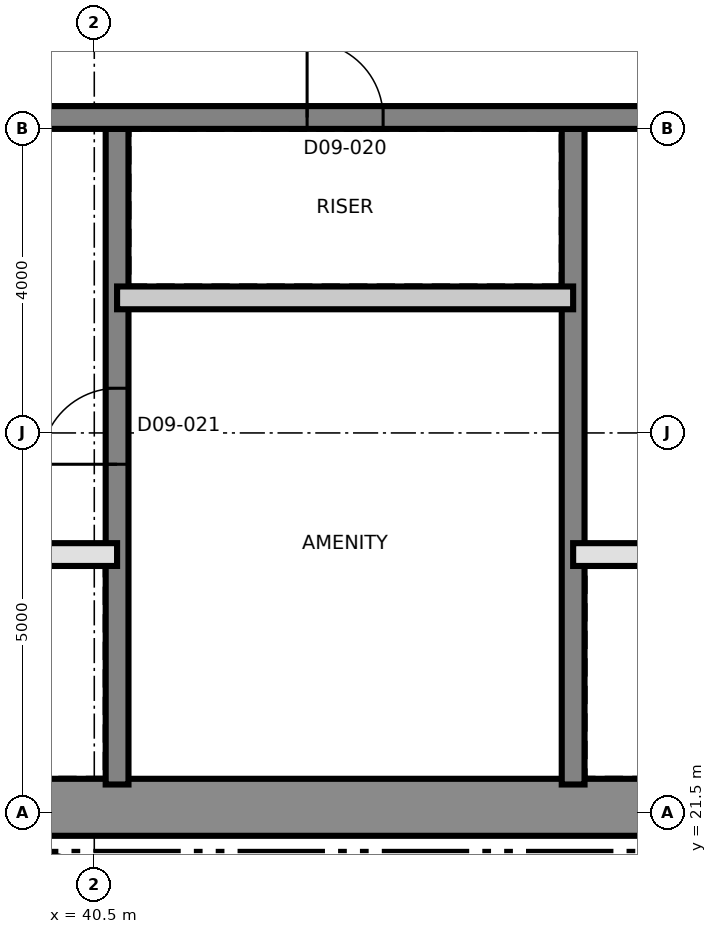
"""IFC4 building model, lengths in metres.
Left out: names, types, materials, properties, quantities, classifications, styles, units other than length and angle.
Written with IfcOpenShell. Run it as: python <this file> out.ifc"""

import sys

from ifc_helpers import new_model, si_unit, direction, frame, frame_2d, origin, place, context, subcontext, project, spatial, rectangle, extrude, element, fill, save


model = new_model("IFC4")
c1 = context("Model", 3, precision=1e-05, world=origin(), true_north=direction((0.0, 1.0)))
c2 = subcontext(c1, "Body", "Model", "MODEL_VIEW")
j1 = project(units=[si_unit("LENGTHUNIT", "METRE"), si_unit("PLANEANGLEUNIT", "RADIAN")], contexts=[c1])
p1 = place(None, origin())
s1 = spatial("IfcSite", under=j1, at=p1, CompositionType="ELEMENT")
p2 = place(p1, origin())
s2 = spatial("IfcBuilding", under=s1, at=p2, CompositionType="ELEMENT")
p3 = place(p2, frame((0.0, 0.0, 113.0)))
s3 = spatial("IfcBuildingStorey", under=s2, at=p3, CompositionType="ELEMENT", Elevation=113.0)
p4 = place(p3, frame((31.125, 21.575, 0.0), z_axis=(0.0, 0.0, 1.0), x_axis=(1.0, 0.0, 0.0)))
e1 = element("IfcWall", 1, at=p4, inside=s3, PredefinedType="SHEAR", context=c2, shape_type="SweptSolid", body=[
    extrude(rectangle(XDim=27.0, YDim=0.75, at=frame_2d((13.5, 0.0))), origin(), (0.0, 0.0, 1.0), 3.7),
])
p5 = place(p3, frame((40.8, 21.875, 0.0), z_axis=(0.0, 0.0, 1.0), x_axis=(0.0, 1.0, 0.0)))
e2 = element("IfcWall", 2, at=p5, inside=s3, PredefinedType="SHEAR", context=c2, shape_type="SweptSolid", body=[
    extrude(rectangle(XDim=8.625, YDim=0.3, at=frame_2d((4.312, 0.0))), origin(), (0.0, 0.0, 1.0), 3.7),
])
p6 = place(p5, frame((4.213, 0.0, 0.0)))
e3 = element("IfcOpeningElement", 3, at=p6, cuts=e2, PredefinedType="OPENING", context=c2, shape_type="SweptSolid", body=[
    extrude(rectangle(XDim=1.0, YDim=2.1, at=frame_2d((0.5, 1.05))), frame((0.0, 0.16, 0.0), z_axis=(0.0, -1.0, 0.0), x_axis=(1.0, 0.0, 0.0)), (0.0, 0.0, 1.0), 0.32),
])
p7 = place(p3, frame((46.8, 21.875, 0.0), z_axis=(0.0, 0.0, 1.0), x_axis=(0.0, 1.0, 0.0)))
e4 = element("IfcWall", 4, at=p7, inside=s3, PredefinedType="SHEAR", context=c2, shape_type="SweptSolid", body=[
    extrude(rectangle(XDim=8.625, YDim=0.3, at=frame_2d((4.312, 0.0))), origin(), (0.0, 0.0, 1.0), 3.7),
])
p8 = place(p3, frame((31.875, 30.65, 0.0), z_axis=(0.0, 0.0, 1.0), x_axis=(1.0, 0.0, 0.0)))
e5 = element("IfcWall", 5, at=p8, inside=s3, PredefinedType="SHEAR", context=c2, shape_type="SweptSolid", body=[
    extrude(rectangle(XDim=26.25, YDim=0.3, at=frame_2d((13.125, 0.0))), origin(), (0.0, 0.0, 1.0), 3.7),
])
p9 = place(p8, frame((24.625, 0.0, 0.0)))
e6 = element("IfcOpeningElement", 6, at=p9, cuts=e5, PredefinedType="OPENING", context=c2, shape_type="SweptSolid", body=[
    extrude(rectangle(XDim=1.0, YDim=2.1, at=frame_2d((0.5, 1.05))), frame((0.0, 0.16, 0.0), z_axis=(0.0, -1.0, 0.0), x_axis=(1.0, 0.0, 0.0)), (0.0, 0.0, 1.0), 0.32),
])
p10 = place(p8, frame((11.425, 0.0, 0.0)))
e7 = element("IfcOpeningElement", 7, at=p10, cuts=e5, PredefinedType="OPENING", context=c2, shape_type="SweptSolid", body=[
    extrude(rectangle(XDim=1.0, YDim=2.1, at=frame_2d((0.5, 1.05))), frame((0.0, 0.16, 0.0), z_axis=(0.0, -1.0, 0.0), x_axis=(1.0, 0.0, 0.0)), (0.0, 0.0, 1.0), 0.32),
])
p11 = place(p3, frame((39.735, 20.846, 0.0), z_axis=(0.0, 0.0, 1.0), x_axis=(0.97206095595, -0.234728562212, 0.0)))
e8 = element("IfcWall", 8, at=p11, inside=s3, PredefinedType="SOLIDWALL", context=c2, shape_type="SweptSolid", body=[
    extrude(rectangle(XDim=2.35, YDim=0.3, at=frame_2d((1.175, 0.0))), origin(), (0.0, 0.0, 1.0), 3.4),
])
p12 = place(p3, frame((31.8, 24.9, 0.0), z_axis=(0.0, 0.0, 1.0), x_axis=(1.0, 0.0, 0.0)))
e9 = element("IfcWall", 9, at=p12, inside=s3, PredefinedType="SOLIDWALL", context=c2, shape_type="SweptSolid", body=[
    extrude(rectangle(XDim=9.0, YDim=0.3, at=frame_2d((4.5, 0.0))), origin(), (0.0, 0.0, 1.0), 3.4),
])
p13 = place(p12, frame((7.05, 0.0, 0.0)))
e10 = element("IfcOpeningElement", 10, at=p13, cuts=e9, PredefinedType="OPENING", context=c2, shape_type="SweptSolid", body=[
    extrude(rectangle(XDim=0.9, YDim=2.1, at=frame_2d((0.45, 1.05))), frame((0.0, 0.16, 0.0), z_axis=(0.0, -1.0, 0.0), x_axis=(1.0, 0.0, 0.0)), (0.0, 0.0, 1.0), 0.32),
])
p14 = place(p12, frame((0.95, 0.0, 0.0)))
e11 = element("IfcOpeningElement", 11, at=p14, cuts=e9, PredefinedType="OPENING", context=c2, shape_type="SweptSolid", body=[
    extrude(rectangle(XDim=1.1, YDim=2.4, at=frame_2d((0.55, 1.2))), frame((0.0, 0.16, 0.0), z_axis=(0.0, -1.0, 0.0), x_axis=(1.0, 0.0, 0.0)), (0.0, 0.0, 1.0), 0.32),
])
p15 = place(p12, frame((3.95, 0.0, 0.0)))
e12 = element("IfcOpeningElement", 12, at=p15, cuts=e9, PredefinedType="OPENING", context=c2, shape_type="SweptSolid", body=[
    extrude(rectangle(XDim=1.1, YDim=2.4, at=frame_2d((0.55, 1.2))), frame((0.0, 0.16, 0.0), z_axis=(0.0, -1.0, 0.0), x_axis=(1.0, 0.0, 0.0)), (0.0, 0.0, 1.0), 0.32),
])
p16 = place(p3, frame((46.8, 24.9, 0.0), z_axis=(0.0, 0.0, 1.0), x_axis=(1.0, 0.0, 0.0)))
e13 = element("IfcWall", 13, at=p16, inside=s3, PredefinedType="SOLIDWALL", context=c2, shape_type="SweptSolid", body=[
    extrude(rectangle(XDim=9.0, YDim=0.3, at=frame_2d((4.5, 0.0))), origin(), (0.0, 0.0, 1.0), 3.4),
])
p17 = place(p16, frame((1.05, 0.0, 0.0)))
e14 = element("IfcOpeningElement", 14, at=p17, cuts=e13, PredefinedType="OPENING", context=c2, shape_type="SweptSolid", body=[
    extrude(rectangle(XDim=0.9, YDim=2.1, at=frame_2d((0.45, 1.05))), frame((0.0, 0.16, 0.0), z_axis=(0.0, -1.0, 0.0), x_axis=(1.0, 0.0, 0.0)), (0.0, 0.0, 1.0), 0.32),
])
p18 = place(p3, frame((40.8, 28.277, 0.0), z_axis=(0.0, 0.0, 1.0), x_axis=(1.0, 0.0, 0.0)))
e15 = element("IfcWall", 15, at=p18, inside=s3, PredefinedType="PARTITIONING", context=c2, shape_type="SweptSolid", body=[
    extrude(rectangle(XDim=6.0, YDim=0.3, at=frame_2d((3.0, 0.0))), origin(), (0.0, 0.0, 1.0), 3.4),
])
p19 = place(p10, origin())
e16 = element("IfcDoor", 16, at=p19, inside=s3, OperationType="SINGLE_SWING_LEFT", PredefinedType="DOOR", context=c2, shape_type="SweptSolid", body=[
    extrude(rectangle(XDim=1.0, YDim=2.1, at=frame_2d((0.5, 1.05))), frame((0.0, 0.025, 0.0), z_axis=(0.0, -1.0, 0.0), x_axis=(1.0, 0.0, 0.0)), (0.0, 0.0, 1.0), 0.05),
])
fill(e7, e16)
p20 = place(p6, origin())
e17 = element("IfcDoor", 17, at=p20, inside=s3, OperationType="SINGLE_SWING_RIGHT", PredefinedType="DOOR", context=c2, shape_type="SweptSolid", body=[
    extrude(rectangle(XDim=1.0, YDim=2.1, at=frame_2d((0.5, 1.05))), frame((0.0, 0.025, 0.0), z_axis=(0.0, -1.0, 0.0), x_axis=(1.0, 0.0, 0.0)), (0.0, 0.0, 1.0), 0.05),
])
fill(e3, e17)
save(model, sys.argv[1])
